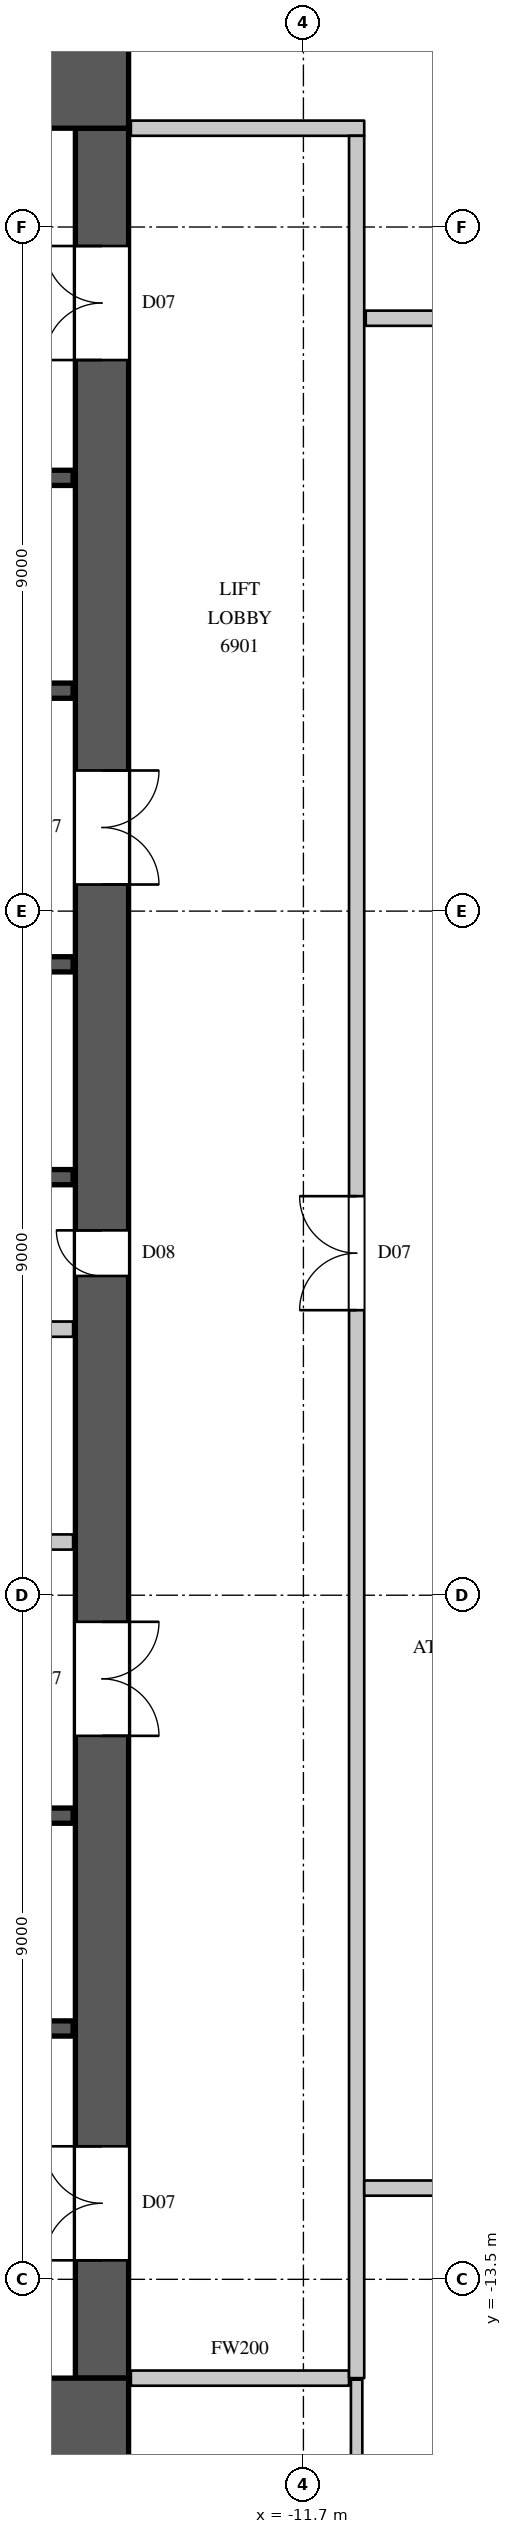
"""IFC4 building model, lengths in metres.
Left out: names, types, materials, properties, quantities, classifications, styles, units other than length and angle.
Written with IfcOpenShell. Run it as: python <this file> out.ifc"""

import sys

from ifc_helpers import new_model, si_unit, direction, frame, frame_2d, origin, place, context, subcontext, project, spatial, rectangle, extrude, element, fill, save


model = new_model("IFC4")
c1 = context("Model", 3, precision=1e-05, world=origin(), true_north=direction((0.0, 1.0)))
c2 = subcontext(c1, "Body", "Model", "MODEL_VIEW")
j1 = project(units=[si_unit("LENGTHUNIT", "METRE"), si_unit("PLANEANGLEUNIT", "RADIAN")], contexts=[c1])
p1 = place(None, origin())
s1 = spatial("IfcSite", under=j1, at=p1, CompositionType="ELEMENT")
p2 = place(p1, origin())
s2 = spatial("IfcBuilding", under=s1, at=p2, CompositionType="ELEMENT")
p3 = place(p2, frame((0.0, 0.0, 304.9)))
s3 = spatial("IfcBuildingStorey", under=s2, at=p3, CompositionType="ELEMENT", Elevation=304.9)
for number, where, z_axis, x_axis in (
    (1, (-30.0, 15.4, 0.0), (0.0, 0.0, 1.0), (1.0, 0.0, 0.0)),
    (2, (-30.0, -15.4, 0.0), (0.0, 0.0, 1.0), (1.0, 0.0, 0.0)),
):
    element("IfcWall", number, at=place(p3, frame(where, z_axis=z_axis, x_axis=x_axis)), inside=s3, PredefinedType="SHEAR", context=c2, shape_type="SweptSolid", body=[
        extrude(rectangle(XDim=16.0, YDim=1.2, at=frame_2d((8.0, 0.0))), origin(), (0.0, 0.0, 1.0), 4.1),
    ])
p4 = place(p3, frame((-14.35, -14.8, 0.0), z_axis=(0.0, 0.0, 1.0), x_axis=(0.0, 1.0, 0.0)))
e3 = element("IfcWall", 3, at=p4, inside=s3, PredefinedType="SHEAR", context=c2, shape_type="SweptSolid", body=[
    extrude(rectangle(XDim=29.6, YDim=0.7, at=frame_2d((14.8, 0.0))), origin(), (0.0, 0.0, 1.0), 4.1),
])
p5 = place(p4, frame((1.55, 0.0, 0.0)))
e4 = element("IfcOpeningElement", 4, at=p5, cuts=e3, PredefinedType="OPENING", context=c2, shape_type="SweptSolid", body=[
    extrude(rectangle(XDim=1.5, YDim=2.4, at=frame_2d((0.75, 1.2))), frame((0.0, 0.36, 0.0), z_axis=(0.0, -1.0, 0.0), x_axis=(1.0, 0.0, 0.0)), (0.0, 0.0, 1.0), 0.72),
])
p6 = place(p4, frame((26.55, 0.0, 0.0)))
e5 = element("IfcOpeningElement", 5, at=p6, cuts=e3, PredefinedType="OPENING", context=c2, shape_type="SweptSolid", body=[
    extrude(rectangle(XDim=1.5, YDim=2.4, at=frame_2d((0.75, 1.2))), frame((0.0, 0.36, 0.0), z_axis=(0.0, -1.0, 0.0), x_axis=(1.0, 0.0, 0.0)), (0.0, 0.0, 1.0), 0.72),
])
p7 = place(p4, frame((8.45, 0.0, 0.0)))
e6 = element("IfcOpeningElement", 6, at=p7, cuts=e3, PredefinedType="OPENING", context=c2, shape_type="SweptSolid", body=[
    extrude(rectangle(XDim=1.5, YDim=2.4, at=frame_2d((0.75, 1.2))), frame((0.0, 0.36, 0.0), z_axis=(0.0, -1.0, 0.0), x_axis=(1.0, 0.0, 0.0)), (0.0, 0.0, 1.0), 0.72),
])
p8 = place(p4, frame((19.65, 0.0, 0.0)))
e7 = element("IfcOpeningElement", 7, at=p8, cuts=e3, PredefinedType="OPENING", context=c2, shape_type="SweptSolid", body=[
    extrude(rectangle(XDim=1.5, YDim=2.4, at=frame_2d((0.75, 1.2))), frame((0.0, 0.36, 0.0), z_axis=(0.0, -1.0, 0.0), x_axis=(1.0, 0.0, 0.0)), (0.0, 0.0, 1.0), 0.72),
])
p9 = place(p4, frame((14.5, 0.0, 0.0)))
e8 = element("IfcOpeningElement", 8, at=p9, cuts=e3, PredefinedType="OPENING", context=c2, shape_type="SweptSolid", body=[
    extrude(rectangle(XDim=0.6, YDim=2.0, at=frame_2d((0.3, 1.0))), frame((0.0, 0.36, 0.0), z_axis=(0.0, -1.0, 0.0), x_axis=(1.0, 0.0, 0.0)), (0.0, 0.0, 1.0), 0.72),
])
p10 = place(p3, frame((-29.27, -3.8, 0.0), z_axis=(0.0, 0.0, 1.0), x_axis=(1.0, 0.0, 0.0)))
e9 = element("IfcWall", 9, at=p10, inside=s3, PredefinedType="PARTITIONING", context=c2, shape_type="SweptSolid", body=[
    extrude(rectangle(XDim=14.54, YDim=0.2, at=frame_2d((7.27, 0.0))), origin(), (0.0, 0.0, 1.0), 3.8),
])
p11 = place(p10, frame((6.8, 0.0, 0.0)))
e10 = element("IfcOpeningElement", 10, at=p11, cuts=e9, PredefinedType="OPENING", context=c2, shape_type="SweptSolid", body=[
    extrude(rectangle(XDim=0.9, YDim=2.2, at=frame_2d((0.45, 1.1))), frame((0.0, 0.11, 0.0), z_axis=(0.0, -1.0, 0.0), x_axis=(1.0, 0.0, 0.0)), (0.0, 0.0, 1.0), 0.22),
])
p12 = place(p3, frame((-13.97, -14.8, 0.0), z_axis=(0.0, 0.0, 1.0), x_axis=(1.0, 0.0, 0.0)))
e11 = element("IfcWall", 11, at=p12, inside=s3, PredefinedType="PARTITIONING", context=c2, shape_type="SweptSolid", body=[
    extrude(rectangle(XDim=2.87, YDim=0.2, at=frame_2d((1.435, 0.0))), origin(), (0.0, 0.0, 1.0), 3.8),
])
p13 = place(p3, frame((-13.97, 14.8, 0.0), z_axis=(0.0, 0.0, 1.0), x_axis=(1.0, 0.0, 0.0)))
e12 = element("IfcWall", 12, at=p13, inside=s3, PredefinedType="PARTITIONING", context=c2, shape_type="SweptSolid", body=[
    extrude(rectangle(XDim=3.07, YDim=0.2, at=frame_2d((1.535, 0.0))), origin(), (0.0, 0.0, 1.0), 3.8),
])
p14 = place(p3, frame((-11.0, -14.8, 0.0), z_axis=(0.0, 0.0, 1.0), x_axis=(0.0, 1.0, 0.0)))
e13 = element("IfcWall", 13, at=p14, inside=s3, PredefinedType="PARTITIONING", context=c2, shape_type="SweptSolid", body=[
    extrude(rectangle(XDim=29.5, YDim=0.2, at=frame_2d((14.75, 0.0))), origin(), (0.0, 0.0, 1.0), 3.8),
])
p15 = place(p14, frame((14.05, 0.0, 0.0)))
e14 = element("IfcOpeningElement", 14, at=p15, cuts=e13, PredefinedType="OPENING", context=c2, shape_type="SweptSolid", body=[
    extrude(rectangle(XDim=1.5, YDim=2.4, at=frame_2d((0.75, 1.2))), frame((0.0, 0.11, 0.0), z_axis=(0.0, -1.0, 0.0), x_axis=(1.0, 0.0, 0.0)), (0.0, 0.0, 1.0), 0.22),
])
p16 = place(p3, frame((-10.9, -12.3, 0.0), z_axis=(0.0, 0.0, 1.0), x_axis=(1.0, 0.0, 0.0)))
e15 = element("IfcWall", 15, at=p16, inside=s3, PredefinedType="PARTITIONING", context=c2, shape_type="SweptSolid", body=[
    extrude(rectangle(XDim=22.1, YDim=0.2, at=frame_2d((11.05, 0.0))), origin(), (0.0, 0.0, 1.0), 3.8),
])
p17 = place(p16, frame((0.95, 0.0, 0.0)))
e16 = element("IfcOpeningElement", 16, at=p17, cuts=e15, PredefinedType="OPENING", context=c2, shape_type="SweptSolid", body=[
    extrude(rectangle(XDim=0.9, YDim=2.2, at=frame_2d((0.45, 1.1))), frame((0.0, 0.11, 0.0), z_axis=(0.0, -1.0, 0.0), x_axis=(1.0, 0.0, 0.0)), (0.0, 0.0, 1.0), 0.22),
])
p18 = place(p16, frame((3.95, 0.0, 0.0)))
e17 = element("IfcOpeningElement", 17, at=p18, cuts=e15, PredefinedType="OPENING", context=c2, shape_type="SweptSolid", body=[
    extrude(rectangle(XDim=0.9, YDim=2.2, at=frame_2d((0.45, 1.1))), frame((0.0, 0.11, 0.0), z_axis=(0.0, -1.0, 0.0), x_axis=(1.0, 0.0, 0.0)), (0.0, 0.0, 1.0), 0.22),
])
p19 = place(p16, frame((7.1, 0.0, 0.0)))
e18 = element("IfcOpeningElement", 18, at=p19, cuts=e15, PredefinedType="OPENING", context=c2, shape_type="SweptSolid", body=[
    extrude(rectangle(XDim=0.9, YDim=2.2, at=frame_2d((0.45, 1.1))), frame((0.0, 0.11, 0.0), z_axis=(0.0, -1.0, 0.0), x_axis=(1.0, 0.0, 0.0)), (0.0, 0.0, 1.0), 0.22),
])
p20 = place(p16, frame((10.0, 0.0, 0.0)))
e19 = element("IfcOpeningElement", 19, at=p20, cuts=e15, PredefinedType="OPENING", context=c2, shape_type="SweptSolid", body=[
    extrude(rectangle(XDim=0.9, YDim=2.2, at=frame_2d((0.45, 1.1))), frame((0.0, 0.11, 0.0), z_axis=(0.0, -1.0, 0.0), x_axis=(1.0, 0.0, 0.0)), (0.0, 0.0, 1.0), 0.22),
])
p21 = place(p16, frame((13.25, 0.0, 0.0)))
e20 = element("IfcOpeningElement", 20, at=p21, cuts=e15, PredefinedType="OPENING", context=c2, shape_type="SweptSolid", body=[
    extrude(rectangle(XDim=0.9, YDim=2.2, at=frame_2d((0.45, 1.1))), frame((0.0, 0.11, 0.0), z_axis=(0.0, -1.0, 0.0), x_axis=(1.0, 0.0, 0.0)), (0.0, 0.0, 1.0), 0.22),
])
p22 = place(p16, frame((16.85, 0.0, 0.0)))
e21 = element("IfcOpeningElement", 21, at=p22, cuts=e15, PredefinedType="OPENING", context=c2, shape_type="SweptSolid", body=[
    extrude(rectangle(XDim=1.1, YDim=2.4, at=frame_2d((0.55, 1.2))), frame((0.0, 0.11, 0.0), z_axis=(0.0, -1.0, 0.0), x_axis=(1.0, 0.0, 0.0)), (0.0, 0.0, 1.0), 0.22),
])
p23 = place(p3, frame((-10.88, 12.3, 0.0), z_axis=(0.0, 0.0, 1.0), x_axis=(1.0, 0.0, 0.0)))
e22 = element("IfcWall", 22, at=p23, inside=s3, PredefinedType="PARTITIONING", context=c2, shape_type="SweptSolid", body=[
    extrude(rectangle(XDim=3.761, YDim=0.2, at=frame_2d((1.881, 0.0))), origin(), (0.0, 0.0, 1.0), 3.8),
])
p24 = place(p23, frame((2.35, 0.0, 0.0)))
e23 = element("IfcOpeningElement", 23, at=p24, cuts=e22, PredefinedType="OPENING", context=c2, shape_type="SweptSolid", body=[
    extrude(rectangle(XDim=1.1, YDim=2.4, at=frame_2d((0.55, 1.2))), frame((0.0, 0.11, 0.0), z_axis=(0.0, -1.0, 0.0), x_axis=(1.0, 0.0, 0.0)), (0.0, 0.0, 1.0), 0.22),
])
p25 = place(p3, frame((-11.0, -23.757, 0.0), z_axis=(0.0, 0.0, 1.0), x_axis=(0.0, 1.0, 0.0)))
e24 = element("IfcWall", 24, at=p25, inside=s3, PredefinedType="PARTITIONING", context=c2, shape_type="SweptSolid", body=[
    extrude(rectangle(XDim=8.937, YDim=0.15, at=frame_2d((4.468, 0.0))), origin(), (0.0, 0.0, 1.0), 3.8),
])
p26 = place(p3, frame((-29.27, -1.0, 0.0), z_axis=(0.0, 0.0, 1.0), x_axis=(1.0, 0.0, 0.0)))
e25 = element("IfcWall", 25, at=p26, inside=s3, PredefinedType="PARTITIONING", context=c2, shape_type="SweptSolid", body=[
    extrude(rectangle(XDim=14.54, YDim=0.2, at=frame_2d((7.27, 0.0))), origin(), (0.0, 0.0, 1.0), 3.8),
])
p27 = place(p3, frame((-17.92, -10.2, 0.0), z_axis=(0.0, 0.0, 1.0), x_axis=(1.0, 0.0, 0.0)))
e26 = element("IfcWall", 26, at=p27, inside=s3, PredefinedType="SHEAR", context=c2, shape_type="SweptSolid", body=[
    extrude(rectangle(XDim=3.19, YDim=0.2, at=frame_2d((1.595, 0.0))), origin(), (0.0, 0.0, 1.0), 3.8),
])
p28 = place(p27, frame((1.05, 0.0, 0.0)))
e27 = element("IfcOpeningElement", 27, at=p28, cuts=e26, PredefinedType="OPENING", context=c2, shape_type="SweptSolid", body=[
    extrude(rectangle(XDim=1.1, YDim=2.2, at=frame_2d((0.55, 1.1))), frame((0.0, 0.11, 0.0), z_axis=(0.0, -1.0, 0.0), x_axis=(1.0, 0.0, 0.0)), (0.0, 0.0, 1.0), 0.22),
])
for number, where, z_axis, x_axis in (
    (28, (-17.9, -7.4, 0.0), (0.0, 0.0, 1.0), (1.0, 0.0, 0.0)),
    (29, (-17.9, 1.0, 0.0), (0.0, 0.0, 1.0), (1.0, 0.0, 0.0)),
):
    element("IfcWall", number, at=place(p3, frame(where, z_axis=z_axis, x_axis=x_axis)), inside=s3, PredefinedType="SHEAR", context=c2, shape_type="SweptSolid", body=[
        extrude(rectangle(XDim=3.17, YDim=0.2, at=frame_2d((1.585, 0.0))), origin(), (0.0, 0.0, 1.0), 3.8),
    ])
p29 = place(p3, frame((-17.9, 3.8, 0.0), z_axis=(0.0, 0.0, 1.0), x_axis=(1.0, 0.0, 0.0)))
e30 = element("IfcWall", 30, at=p29, inside=s3, PredefinedType="SHEAR", context=c2, shape_type="SweptSolid", body=[
    extrude(rectangle(XDim=3.17, YDim=0.2, at=frame_2d((1.585, 0.0))), origin(), (0.0, 0.0, 1.0), 3.8),
])
p30 = place(p29, frame((1.05, 0.0, 0.0)))
e31 = element("IfcOpeningElement", 31, at=p30, cuts=e30, PredefinedType="OPENING", context=c2, shape_type="SweptSolid", body=[
    extrude(rectangle(XDim=1.1, YDim=2.2, at=frame_2d((0.55, 1.1))), frame((0.0, 0.11, 0.0), z_axis=(0.0, -1.0, 0.0), x_axis=(1.0, 0.0, 0.0)), (0.0, 0.0, 1.0), 0.22),
])
p31 = place(p3, frame((-17.92, 7.4, 0.0), z_axis=(0.0, 0.0, 1.0), x_axis=(1.0, 0.0, 0.0)))
e32 = element("IfcWall", 32, at=p31, inside=s3, PredefinedType="SHEAR", context=c2, shape_type="SweptSolid", body=[
    extrude(rectangle(XDim=3.19, YDim=0.2, at=frame_2d((1.595, 0.0))), origin(), (0.0, 0.0, 1.0), 3.8),
])
p32 = place(p3, frame((-17.92, 10.2, 0.0), z_axis=(0.0, 0.0, 1.0), x_axis=(1.0, 0.0, 0.0)))
e33 = element("IfcWall", 33, at=p32, inside=s3, PredefinedType="SHEAR", context=c2, shape_type="SweptSolid", body=[
    extrude(rectangle(XDim=3.19, YDim=0.2, at=frame_2d((1.595, 0.0))), origin(), (0.0, 0.0, 1.0), 3.8),
])
p33 = place(p32, frame((1.05, 0.0, 0.0)))
e34 = element("IfcOpeningElement", 34, at=p33, cuts=e33, PredefinedType="OPENING", context=c2, shape_type="SweptSolid", body=[
    extrude(rectangle(XDim=1.1, YDim=2.2, at=frame_2d((0.55, 1.1))), frame((0.0, 0.11, 0.0), z_axis=(0.0, -1.0, 0.0), x_axis=(1.0, 0.0, 0.0)), (0.0, 0.0, 1.0), 0.22),
])
p34 = place(p15, origin())
e35 = element("IfcDoor", 35, at=p34, inside=s3, OperationType="DOUBLE_DOOR_SINGLE_SWING", PredefinedType="DOOR", context=c2, shape_type="SweptSolid", body=[
    extrude(rectangle(XDim=1.5, YDim=2.4, at=frame_2d((0.75, 1.2))), frame((0.0, 0.025, 0.0), z_axis=(0.0, -1.0, 0.0), x_axis=(1.0, 0.0, 0.0)), (0.0, 0.0, 1.0), 0.05),
])
fill(e14, e35)
p35 = place(p5, origin())
e36 = element("IfcDoor", 36, at=p35, inside=s3, OperationType="DOUBLE_DOOR_SINGLE_SWING", PredefinedType="DOOR", context=c2, shape_type="SweptSolid", body=[
    extrude(rectangle(XDim=1.5, YDim=2.4, at=frame_2d((0.75, 1.2))), frame((0.0, 0.345, 0.0), z_axis=(0.0, -1.0, 0.0), x_axis=(1.0, 0.0, 0.0)), (0.0, 0.0, 1.0), 0.05),
])
fill(e4, e36)
p36 = place(p6, origin())
e37 = element("IfcDoor", 37, at=p36, inside=s3, OperationType="DOUBLE_DOOR_SINGLE_SWING", PredefinedType="DOOR", context=c2, shape_type="SweptSolid", body=[
    extrude(rectangle(XDim=1.5, YDim=2.4, at=frame_2d((0.75, 1.2))), frame((0.0, 0.345, 0.0), z_axis=(0.0, -1.0, 0.0), x_axis=(1.0, 0.0, 0.0)), (0.0, 0.0, 1.0), 0.05),
])
fill(e5, e37)
p37 = place(p7, origin())
e38 = element("IfcDoor", 38, at=p37, inside=s3, OperationType="DOUBLE_DOOR_SINGLE_SWING", PredefinedType="DOOR", context=c2, shape_type="SweptSolid", body=[
    extrude(rectangle(XDim=1.5, YDim=2.4, at=frame_2d((0.75, 1.2))), frame((0.0, -0.295, 0.0), z_axis=(0.0, -1.0, 0.0), x_axis=(1.0, 0.0, 0.0)), (0.0, 0.0, 1.0), 0.05),
])
fill(e6, e38)
p38 = place(p8, origin())
e39 = element("IfcDoor", 39, at=p38, inside=s3, OperationType="DOUBLE_DOOR_SINGLE_SWING", PredefinedType="DOOR", context=c2, shape_type="SweptSolid", body=[
    extrude(rectangle(XDim=1.5, YDim=2.4, at=frame_2d((0.75, 1.2))), frame((0.0, -0.295, 0.0), z_axis=(0.0, -1.0, 0.0), x_axis=(1.0, 0.0, 0.0)), (0.0, 0.0, 1.0), 0.05),
])
fill(e7, e39)
p39 = place(p9, origin())
e40 = element("IfcDoor", 40, at=p39, inside=s3, OperationType="SINGLE_SWING_RIGHT", PredefinedType="DOOR", context=c2, shape_type="SweptSolid", body=[
    extrude(rectangle(XDim=0.6, YDim=2.0, at=frame_2d((0.3, 1.0))), frame((0.0, 0.345, 0.0), z_axis=(0.0, -1.0, 0.0), x_axis=(1.0, 0.0, 0.0)), (0.0, 0.0, 1.0), 0.05),
])
fill(e8, e40)
save(model, sys.argv[1])
